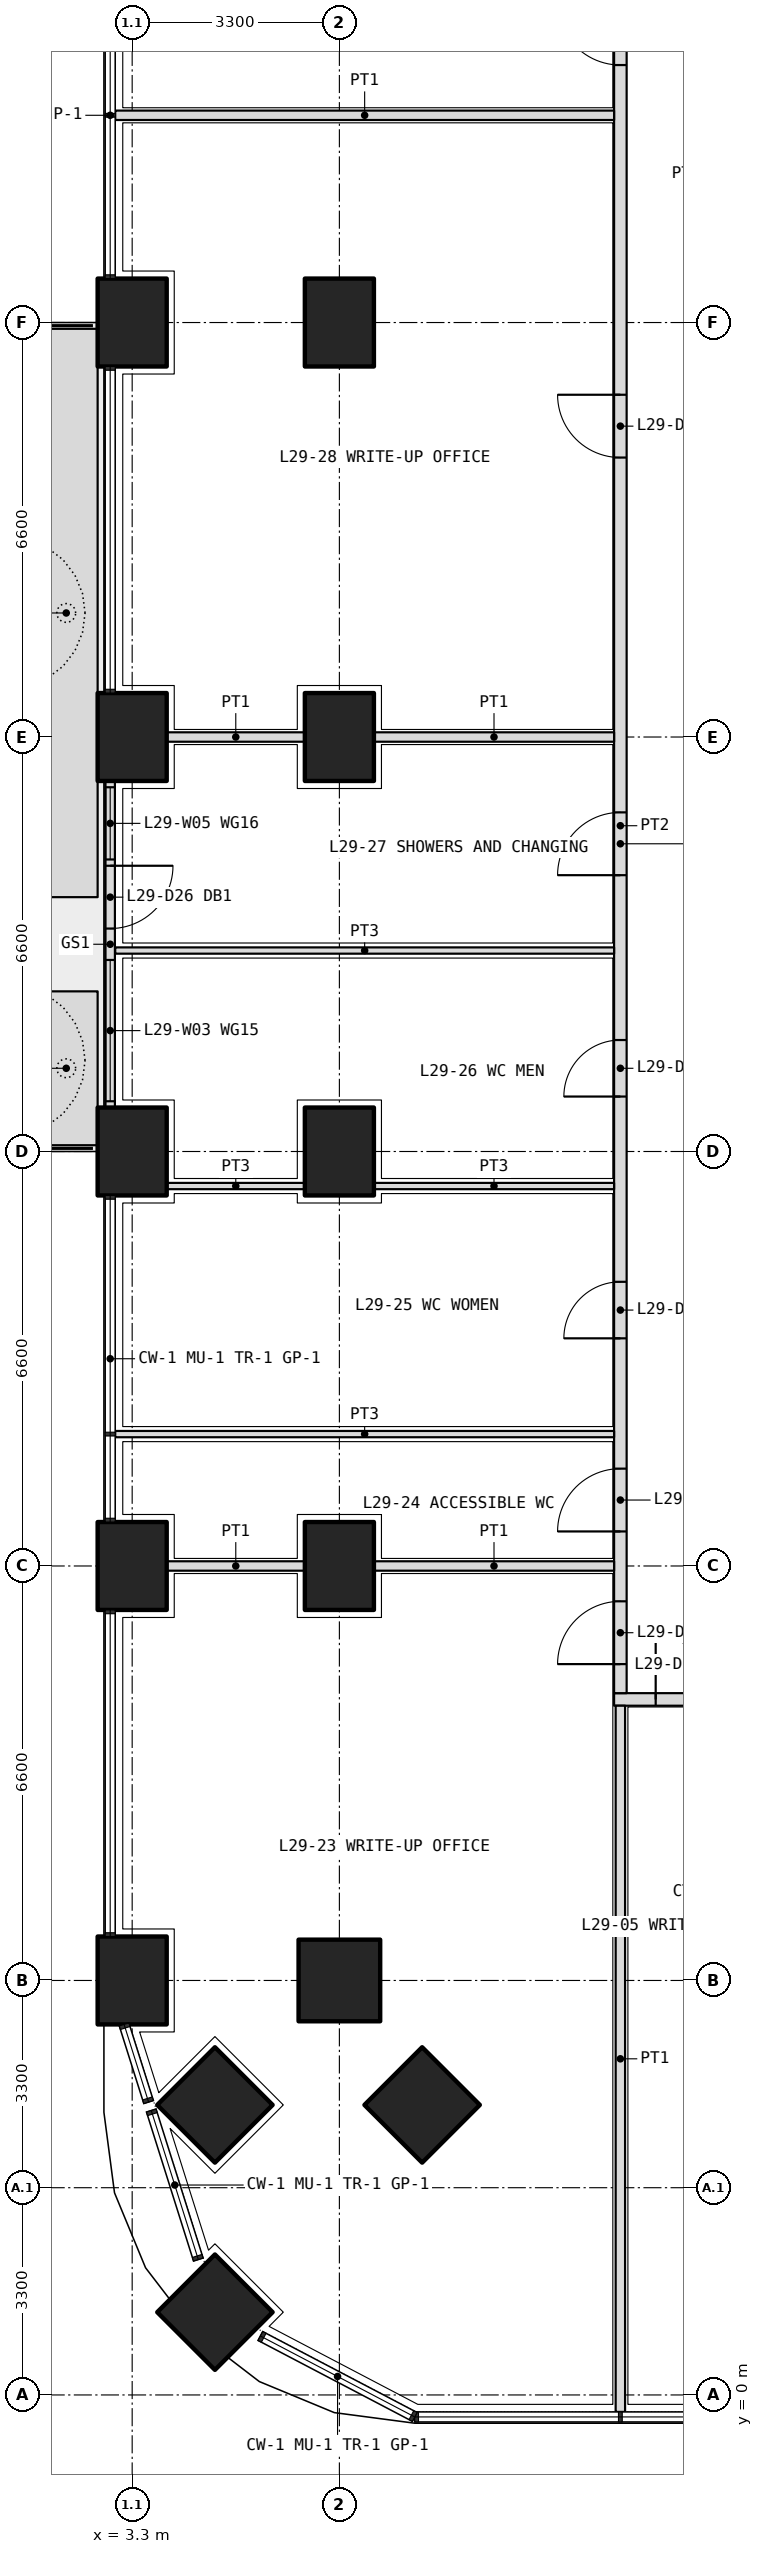
"""IFC4 building model, lengths in metres.
Left out: names, types, materials, properties, quantities, classifications, styles, units other than length and angle.
Written with IfcOpenShell. Run it as: python <this file> out.ifc"""

import sys

from ifc_helpers import new_model, si_unit, direction, frame, frame_2d, origin, origin_2d, place, context, subcontext, project, spatial, polyline, rectangle, outline, extrude, element, fill, save


model = new_model("IFC4")
c1 = context("Model", 3, precision=1e-05, world=origin(), true_north=direction((0.0, 1.0)))
c2 = subcontext(c1, "Body", "Model", "MODEL_VIEW")
j1 = project(units=[si_unit("LENGTHUNIT", "METRE"), si_unit("PLANEANGLEUNIT", "RADIAN")], contexts=[c1])
p1 = place(None, origin())
s1 = spatial("IfcSite", under=j1, at=p1, CompositionType="ELEMENT")
p2 = place(p1, origin())
s2 = spatial("IfcBuilding", under=s1, at=p2, CompositionType="ELEMENT")
p3 = place(p2, frame((0.0, 0.0, 128.4)))
s3 = spatial("IfcBuildingStorey", under=s2, at=p3, CompositionType="ELEMENT", Elevation=128.4)
p4 = place(p3, frame((4.618, 1.318, 0.0), z_axis=(0.0, 0.0, 1.0), x_axis=(0.707106781187, 0.707106781187, 0.0)))
e1 = element("IfcColumn", 1, at=p4, inside=s3, PredefinedType="COLUMN", context=c2, shape_type="SweptSolid", body=[
    extrude(rectangle(XDim=1.3, YDim=1.3, at=origin_2d()), origin(), (0.0, 0.0, 1.0), 4.2),
])
for number, where, z_axis, x_axis in (
    (2, (3.3, 6.6, 0.0), (0.0, 0.0, 1.0), (0.0, 1.0, 0.0)),
    (3, (3.3, 13.2, 0.0), (0.0, 0.0, 1.0), (0.0, 1.0, 0.0)),
    (4, (3.3, 19.8, 0.0), (0.0, 0.0, 1.0), (0.0, 1.0, 0.0)),
    (5, (3.3, 26.4, 0.0), (0.0, 0.0, 1.0), (0.0, 1.0, 0.0)),
    (6, (3.3, 33.0, 0.0), (0.0, 0.0, 1.0), (0.0, 1.0, 0.0)),
):
    element("IfcColumn", number, at=place(p3, frame(where, z_axis=z_axis, x_axis=x_axis)), inside=s3, PredefinedType="COLUMN", context=c2, shape_type="SweptSolid", body=[
        extrude(rectangle(XDim=1.4, YDim=1.1, at=origin_2d()), origin(), (0.0, 0.0, 1.0), 4.2),
    ])
for number, where, z_axis, x_axis in (
    (7, (6.6, 6.6, 0.0), (0.0, 0.0, 1.0), (1.0, 0.0, 0.0)),
    (8, (4.618, 4.618, 0.0), (0.0, 0.0, 1.0), (0.707, 0.707, 0.0)),
    (9, (7.918, 4.618, 0.0), (0.0, 0.0, 1.0), (0.707, 0.707, 0.0)),
):
    element("IfcColumn", number, at=place(p3, frame(where, z_axis=z_axis, x_axis=x_axis)), inside=s3, PredefinedType="COLUMN", context=c2, shape_type="SweptSolid", body=[
        extrude(rectangle(XDim=1.3, YDim=1.3, at=origin_2d()), origin(), (0.0, 0.0, 1.0), 4.2),
    ])
for number, where, z_axis, x_axis in (
    (10, (6.6, 13.2, 0.0), (0.0, 0.0, 1.0), (0.0, 1.0, 0.0)),
    (11, (6.6, 19.8, 0.0), (0.0, 0.0, 1.0), (0.0, 1.0, 0.0)),
    (12, (6.6, 26.4, 0.0), (0.0, 0.0, 1.0), (0.0, 1.0, 0.0)),
    (13, (6.6, 33.0, 0.0), (0.0, 0.0, 1.0), (0.0, 1.0, 0.0)),
):
    element("IfcColumn", number, at=place(p3, frame(where, z_axis=z_axis, x_axis=x_axis)), inside=s3, PredefinedType="COLUMN", context=c2, shape_type="SweptSolid", body=[
        extrude(rectangle(XDim=1.4, YDim=1.1, at=origin_2d()), origin(), (0.0, 0.0, 1.0), 4.2),
    ])
p5 = place(p3, origin())
e14 = element("IfcWall", 14, at=p5, inside=s3, PredefinedType="USERDEFINED", context=c2, shape_type="SweptSolid", body=[
    extrude(outline(polyline([(1.75, 19.9), (2.75, 19.9), (2.75, 22.35), (1.75, 22.35), (1.75, 19.9)]), holes=[polyline([(1.9, 20.05), (2.6, 20.05), (2.6, 22.2), (1.9, 22.2), (1.9, 20.05)])]), origin(), (0.0, 0.0, 1.0), 1.05),
])
p6 = place(p3, origin())
e15 = element("IfcWall", 15, at=p6, inside=s3, PredefinedType="USERDEFINED", context=c2, shape_type="SweptSolid", body=[
    extrude(outline(polyline([(1.75, 23.85), (2.75, 23.85), (2.75, 32.9), (1.75, 32.9), (1.75, 23.85)]), holes=[polyline([(1.9, 24.0), (2.6, 24.0), (2.6, 32.75), (1.9, 32.75), (1.9, 24.0)])]), origin(), (0.0, 0.0, 1.0), 1.05),
])
p7 = place(p3, frame((2.95, 25.7, 0.0), z_axis=(0.0, 0.0, 1.0), x_axis=(0.0, -1.0, 0.0)))
e16 = element("IfcWall", 16, at=p7, inside=s3, PredefinedType="SOLIDWALL", context=c2, shape_type="SweptSolid", body=[
    extrude(rectangle(XDim=5.2, YDim=0.15, at=frame_2d((2.6, 0.0))), origin(), (0.0, 0.0, 1.0), 2.7),
])
p8 = place(p7, frame((1.35, 0.0, 0.0)))
e17 = element("IfcOpeningElement", 17, at=p8, cuts=e16, PredefinedType="OPENING", context=c2, shape_type="SweptSolid", body=[
    extrude(rectangle(XDim=1.0, YDim=2.4, at=frame_2d((0.5, 1.2))), frame((0.0, 0.085, 0.0), z_axis=(0.0, -1.0, 0.0), x_axis=(1.0, 0.0, 0.0)), (0.0, 0.0, 1.0), 0.17),
])
p9 = place(p7, frame((0.1, 0.0, 0.1)))
e18 = element("IfcOpeningElement", 18, at=p9, cuts=e16, PredefinedType="OPENING", context=c2, shape_type="SweptSolid", body=[
    extrude(rectangle(XDim=1.15, YDim=2.3, at=frame_2d((0.575, 1.15))), frame((0.0, 0.085, 0.0), z_axis=(0.0, -1.0, 0.0), x_axis=(1.0, 0.0, 0.0)), (0.0, 0.0, 1.0), 0.17),
])
p10 = place(p7, frame((2.85, 0.0, 0.1)))
e19 = element("IfcOpeningElement", 19, at=p10, cuts=e16, PredefinedType="OPENING", context=c2, shape_type="SweptSolid", body=[
    extrude(rectangle(XDim=2.25, YDim=2.3, at=frame_2d((1.125, 1.15))), frame((0.0, 0.085, 0.0), z_axis=(0.0, -1.0, 0.0), x_axis=(1.0, 0.0, 0.0)), (0.0, 0.0, 1.0), 0.17),
])
p11 = place(p3, frame((10.975, 11.075, 0.0), z_axis=(0.0, 0.0, 1.0), x_axis=(1.0, 0.0, 0.0)))
e20 = element("IfcWall", 20, at=p11, inside=s3, PredefinedType="PARTITIONING", context=c2, shape_type="SweptSolid", body=[
    extrude(rectangle(XDim=12.125, YDim=0.2, at=frame_2d((6.062, 0.0))), origin(), (0.0, 0.0, 1.0), 2.85),
])
p12 = place(p11, frame((0.663, 0.0, 0.0)))
e21 = element("IfcOpeningElement", 21, at=p12, cuts=e20, PredefinedType="OPENING", context=c2, shape_type="SweptSolid", body=[
    extrude(rectangle(XDim=1.0, YDim=2.1, at=frame_2d((0.5, 1.05))), frame((0.0, 0.11, 0.0), z_axis=(0.0, -1.0, 0.0), x_axis=(1.0, 0.0, 0.0)), (0.0, 0.0, 1.0), 0.22),
])
p13 = place(p11, frame((6.675, 0.0, 0.0)))
e22 = element("IfcOpeningElement", 22, at=p13, cuts=e20, PredefinedType="OPENING", context=c2, shape_type="SweptSolid", body=[
    extrude(rectangle(XDim=1.0, YDim=2.1, at=frame_2d((0.5, 1.05))), frame((0.0, 0.11, 0.0), z_axis=(0.0, -1.0, 0.0), x_axis=(1.0, 0.0, 0.0)), (0.0, 0.0, 1.0), 0.22),
])
p14 = place(p3, frame((11.075, 11.175, 0.0), z_axis=(0.0, 0.0, 1.0), x_axis=(0.0, 1.0, 0.0)))
e23 = element("IfcWall", 23, at=p14, inside=s3, PredefinedType="PARTITIONING", context=c2, shape_type="SweptSolid", body=[
    extrude(rectangle(XDim=27.625, YDim=0.2, at=frame_2d((13.812, 0.0))), origin(), (0.0, 0.0, 1.0), 2.85),
])
p15 = place(p14, frame((0.462, 0.0, 0.0)))
e24 = element("IfcOpeningElement", 24, at=p15, cuts=e23, PredefinedType="OPENING", context=c2, shape_type="SweptSolid", body=[
    extrude(rectangle(XDim=1.0, YDim=2.1, at=frame_2d((0.5, 1.05))), frame((0.0, 0.11, 0.0), z_axis=(0.0, -1.0, 0.0), x_axis=(1.0, 0.0, 0.0)), (0.0, 0.0, 1.0), 0.22),
])
p16 = place(p14, frame((2.575, 0.0, 0.0)))
e25 = element("IfcOpeningElement", 25, at=p16, cuts=e23, PredefinedType="OPENING", context=c2, shape_type="SweptSolid", body=[
    extrude(rectangle(XDim=1.0, YDim=2.1, at=frame_2d((0.5, 1.05))), frame((0.0, 0.11, 0.0), z_axis=(0.0, -1.0, 0.0), x_axis=(1.0, 0.0, 0.0)), (0.0, 0.0, 1.0), 0.22),
])
p17 = place(p14, frame((5.65, 0.0, 0.0)))
e26 = element("IfcOpeningElement", 26, at=p17, cuts=e23, PredefinedType="OPENING", context=c2, shape_type="SweptSolid", body=[
    extrude(rectangle(XDim=0.9, YDim=2.1, at=frame_2d((0.45, 1.05))), frame((0.0, 0.11, 0.0), z_axis=(0.0, -1.0, 0.0), x_axis=(1.0, 0.0, 0.0)), (0.0, 0.0, 1.0), 0.22),
])
p18 = place(p14, frame((9.5, 0.0, 0.0)))
e27 = element("IfcOpeningElement", 27, at=p18, cuts=e23, PredefinedType="OPENING", context=c2, shape_type="SweptSolid", body=[
    extrude(rectangle(XDim=0.9, YDim=2.1, at=frame_2d((0.45, 1.05))), frame((0.0, 0.11, 0.0), z_axis=(0.0, -1.0, 0.0), x_axis=(1.0, 0.0, 0.0)), (0.0, 0.0, 1.0), 0.22),
])
p19 = place(p14, frame((13.025, 0.0, 0.0)))
e28 = element("IfcOpeningElement", 28, at=p19, cuts=e23, PredefinedType="OPENING", context=c2, shape_type="SweptSolid", body=[
    extrude(rectangle(XDim=1.0, YDim=2.1, at=frame_2d((0.5, 1.05))), frame((0.0, 0.11, 0.0), z_axis=(0.0, -1.0, 0.0), x_axis=(1.0, 0.0, 0.0)), (0.0, 0.0, 1.0), 0.22),
])
p20 = place(p14, frame((19.675, 0.0, 0.0)))
e29 = element("IfcOpeningElement", 29, at=p20, cuts=e23, PredefinedType="OPENING", context=c2, shape_type="SweptSolid", body=[
    extrude(rectangle(XDim=1.0, YDim=2.1, at=frame_2d((0.5, 1.05))), frame((0.0, 0.11, 0.0), z_axis=(0.0, -1.0, 0.0), x_axis=(1.0, 0.0, 0.0)), (0.0, 0.0, 1.0), 0.22),
])
p21 = place(p14, frame((25.925, 0.0, 0.0)))
e30 = element("IfcOpeningElement", 30, at=p21, cuts=e23, PredefinedType="OPENING", context=c2, shape_type="SweptSolid", body=[
    extrude(rectangle(XDim=1.0, YDim=2.1, at=frame_2d((0.5, 1.05))), frame((0.0, 0.11, 0.0), z_axis=(0.0, -1.0, 0.0), x_axis=(1.0, 0.0, 0.0)), (0.0, 0.0, 1.0), 0.22),
])
p22 = place(p3, frame((11.075, -0.27, 0.0), z_axis=(0.0, 0.0, 1.0), x_axis=(0.0, 1.0, 0.0)))
e31 = element("IfcWall", 31, at=p22, inside=s3, PredefinedType="PARTITIONING", context=c2, shape_type="SweptSolid", body=[
    extrude(rectangle(XDim=11.245, YDim=0.15, at=frame_2d((5.623, 0.0))), origin(), (0.0, 0.0, 1.0), 2.7),
])
p23 = place(p3, frame((3.03, 15.3, 0.0), z_axis=(0.0, 0.0, 1.0), x_axis=(1.0, 0.0, 0.0)))
e32 = element("IfcWall", 32, at=p23, inside=s3, PredefinedType="PARTITIONING", context=c2, shape_type="SweptSolid", body=[
    extrude(rectangle(XDim=7.945, YDim=0.1, at=frame_2d((3.973, 0.0))), origin(), (0.0, 0.0, 1.0), 2.7),
])
p24 = place(p3, frame((3.85, 19.25, 0.0), z_axis=(0.0, 0.0, 1.0), x_axis=(1.0, 0.0, 0.0)))
e33 = element("IfcWall", 33, at=p24, inside=s3, PredefinedType="PARTITIONING", context=c2, shape_type="SweptSolid", body=[
    extrude(rectangle(XDim=2.2, YDim=0.1, at=frame_2d((1.1, 0.0))), origin(), (0.0, 0.0, 1.0), 2.85),
])
p25 = place(p3, frame((7.15, 19.25, 0.0), z_axis=(0.0, 0.0, 1.0), x_axis=(1.0, 0.0, 0.0)))
e34 = element("IfcWall", 34, at=p25, inside=s3, PredefinedType="PARTITIONING", context=c2, shape_type="SweptSolid", body=[
    extrude(rectangle(XDim=3.825, YDim=0.1, at=frame_2d((1.913, 0.0))), origin(), (0.0, 0.0, 1.0), 2.85),
])
p26 = place(p3, frame((3.03, 23.0, 0.0), z_axis=(0.0, 0.0, 1.0), x_axis=(1.0, 0.0, 0.0)))
e35 = element("IfcWall", 35, at=p26, inside=s3, PredefinedType="PARTITIONING", context=c2, shape_type="SweptSolid", body=[
    extrude(rectangle(XDim=7.945, YDim=0.1, at=frame_2d((3.973, 0.0))), origin(), (0.0, 0.0, 1.0), 2.7),
])
p27 = place(p3, frame((3.85, 13.2, 0.0), z_axis=(0.0, 0.0, 1.0), x_axis=(1.0, 0.0, 0.0)))
e36 = element("IfcWall", 36, at=p27, inside=s3, PredefinedType="PARTITIONING", context=c2, shape_type="SweptSolid", body=[
    extrude(rectangle(XDim=2.2, YDim=0.15, at=frame_2d((1.1, 0.0))), origin(), (0.0, 0.0, 1.0), 2.85),
])
p28 = place(p3, frame((7.15, 13.2, 0.0), z_axis=(0.0, 0.0, 1.0), x_axis=(1.0, 0.0, 0.0)))
e37 = element("IfcWall", 37, at=p28, inside=s3, PredefinedType="PARTITIONING", context=c2, shape_type="SweptSolid", body=[
    extrude(rectangle(XDim=3.825, YDim=0.15, at=frame_2d((1.913, 0.0))), origin(), (0.0, 0.0, 1.0), 2.85),
])
p29 = place(p3, frame((3.85, 26.4, 0.0), z_axis=(0.0, 0.0, 1.0), x_axis=(1.0, 0.0, 0.0)))
e38 = element("IfcWall", 38, at=p29, inside=s3, PredefinedType="PARTITIONING", context=c2, shape_type="SweptSolid", body=[
    extrude(rectangle(XDim=2.2, YDim=0.15, at=frame_2d((1.1, 0.0))), origin(), (0.0, 0.0, 1.0), 2.85),
])
p30 = place(p3, frame((7.15, 26.4, 0.0), z_axis=(0.0, 0.0, 1.0), x_axis=(1.0, 0.0, 0.0)))
e39 = element("IfcWall", 39, at=p30, inside=s3, PredefinedType="PARTITIONING", context=c2, shape_type="SweptSolid", body=[
    extrude(rectangle(XDim=3.825, YDim=0.15, at=frame_2d((1.913, 0.0))), origin(), (0.0, 0.0, 1.0), 2.85),
])
p31 = place(p3, frame((3.03, 36.3, 0.0), z_axis=(0.0, 0.0, 1.0), x_axis=(1.0, 0.0, 0.0)))
e40 = element("IfcWall", 40, at=p31, inside=s3, PredefinedType="PARTITIONING", context=c2, shape_type="SweptSolid", body=[
    extrude(rectangle(XDim=7.945, YDim=0.15, at=frame_2d((3.973, 0.0))), origin(), (0.0, 0.0, 1.0), 2.7),
])
p32 = place(p8, origin())
e41 = element("IfcDoor", 41, at=p32, inside=s3, OperationType="SINGLE_SWING_LEFT", PredefinedType="DOOR", context=c2, shape_type="SweptSolid", body=[
    extrude(rectangle(XDim=1.0, YDim=2.4, at=frame_2d((0.5, 1.2))), frame((0.0, 0.025, 0.0), z_axis=(0.0, -1.0, 0.0), x_axis=(1.0, 0.0, 0.0)), (0.0, 0.0, 1.0), 0.05),
])
fill(e17, e41)
p33 = place(p9, origin())
e42 = element("IfcWindow", 42, at=p33, inside=s3, PartitioningType="SINGLE_PANEL", PredefinedType="WINDOW", context=c2, shape_type="SweptSolid", body=[
    extrude(rectangle(XDim=1.15, YDim=2.3, at=frame_2d((0.575, 1.15))), frame((0.0, 0.03, 0.0), z_axis=(0.0, -1.0, 0.0), x_axis=(1.0, 0.0, 0.0)), (0.0, 0.0, 1.0), 0.06),
])
fill(e18, e42)
p34 = place(p10, origin())
e43 = element("IfcWindow", 43, at=p34, inside=s3, PartitioningType="SINGLE_PANEL", PredefinedType="WINDOW", context=c2, shape_type="SweptSolid", body=[
    extrude(rectangle(XDim=2.25, YDim=2.3, at=frame_2d((1.125, 1.15))), frame((0.0, 0.03, 0.0), z_axis=(0.0, -1.0, 0.0), x_axis=(1.0, 0.0, 0.0)), (0.0, 0.0, 1.0), 0.06),
])
fill(e19, e43)
p35 = place(p12, origin())
e44 = element("IfcDoor", 44, at=p35, inside=s3, OperationType="SINGLE_SWING_LEFT", PredefinedType="DOOR", context=c2, shape_type="SweptSolid", body=[
    extrude(rectangle(XDim=1.0, YDim=2.1, at=frame_2d((0.5, 1.05))), frame((0.0, 0.025, 0.0), z_axis=(0.0, -1.0, 0.0), x_axis=(1.0, 0.0, 0.0)), (0.0, 0.0, 1.0), 0.05),
])
fill(e21, e44)
p36 = place(p15, origin())
e45 = element("IfcDoor", 45, at=p36, inside=s3, OperationType="SINGLE_SWING_LEFT", PredefinedType="DOOR", context=c2, shape_type="SweptSolid", body=[
    extrude(rectangle(XDim=1.0, YDim=2.1, at=frame_2d((0.5, 1.05))), frame((0.0, 0.025, 0.0), z_axis=(0.0, -1.0, 0.0), x_axis=(1.0, 0.0, 0.0)), (0.0, 0.0, 1.0), 0.05),
])
fill(e24, e45)
p37 = place(p16, origin())
e46 = element("IfcDoor", 46, at=p37, inside=s3, OperationType="SINGLE_SWING_LEFT", PredefinedType="DOOR", context=c2, shape_type="SweptSolid", body=[
    extrude(rectangle(XDim=1.0, YDim=2.1, at=frame_2d((0.5, 1.05))), frame((0.0, 0.025, 0.0), z_axis=(0.0, -1.0, 0.0), x_axis=(1.0, 0.0, 0.0)), (0.0, 0.0, 1.0), 0.05),
])
fill(e25, e46)
p38 = place(p17, origin())
e47 = element("IfcDoor", 47, at=p38, inside=s3, OperationType="SINGLE_SWING_LEFT", PredefinedType="DOOR", context=c2, shape_type="SweptSolid", body=[
    extrude(rectangle(XDim=0.9, YDim=2.1, at=frame_2d((0.45, 1.05))), frame((0.0, 0.025, 0.0), z_axis=(0.0, -1.0, 0.0), x_axis=(1.0, 0.0, 0.0)), (0.0, 0.0, 1.0), 0.05),
])
fill(e26, e47)
p39 = place(p18, origin())
e48 = element("IfcDoor", 48, at=p39, inside=s3, OperationType="SINGLE_SWING_LEFT", PredefinedType="DOOR", context=c2, shape_type="SweptSolid", body=[
    extrude(rectangle(XDim=0.9, YDim=2.1, at=frame_2d((0.45, 1.05))), frame((0.0, 0.025, 0.0), z_axis=(0.0, -1.0, 0.0), x_axis=(1.0, 0.0, 0.0)), (0.0, 0.0, 1.0), 0.05),
])
fill(e27, e48)
p40 = place(p19, origin())
e49 = element("IfcDoor", 49, at=p40, inside=s3, OperationType="SINGLE_SWING_LEFT", PredefinedType="DOOR", context=c2, shape_type="SweptSolid", body=[
    extrude(rectangle(XDim=1.0, YDim=2.1, at=frame_2d((0.5, 1.05))), frame((0.0, 0.025, 0.0), z_axis=(0.0, -1.0, 0.0), x_axis=(1.0, 0.0, 0.0)), (0.0, 0.0, 1.0), 0.05),
])
fill(e28, e49)
p41 = place(p20, origin())
e50 = element("IfcDoor", 50, at=p41, inside=s3, OperationType="SINGLE_SWING_RIGHT", PredefinedType="DOOR", context=c2, shape_type="SweptSolid", body=[
    extrude(rectangle(XDim=1.0, YDim=2.1, at=frame_2d((0.5, 1.05))), frame((0.0, 0.025, 0.0), z_axis=(0.0, -1.0, 0.0), x_axis=(1.0, 0.0, 0.0)), (0.0, 0.0, 1.0), 0.05),
])
fill(e29, e50)
p42 = place(p21, origin())
e51 = element("IfcDoor", 51, at=p42, inside=s3, OperationType="SINGLE_SWING_RIGHT", PredefinedType="DOOR", context=c2, shape_type="SweptSolid", body=[
    extrude(rectangle(XDim=1.0, YDim=2.1, at=frame_2d((0.5, 1.05))), frame((0.0, 0.025, 0.0), z_axis=(0.0, -1.0, 0.0), x_axis=(1.0, 0.0, 0.0)), (0.0, 0.0, 1.0), 0.05),
])
fill(e30, e51)
save(model, sys.argv[1])
